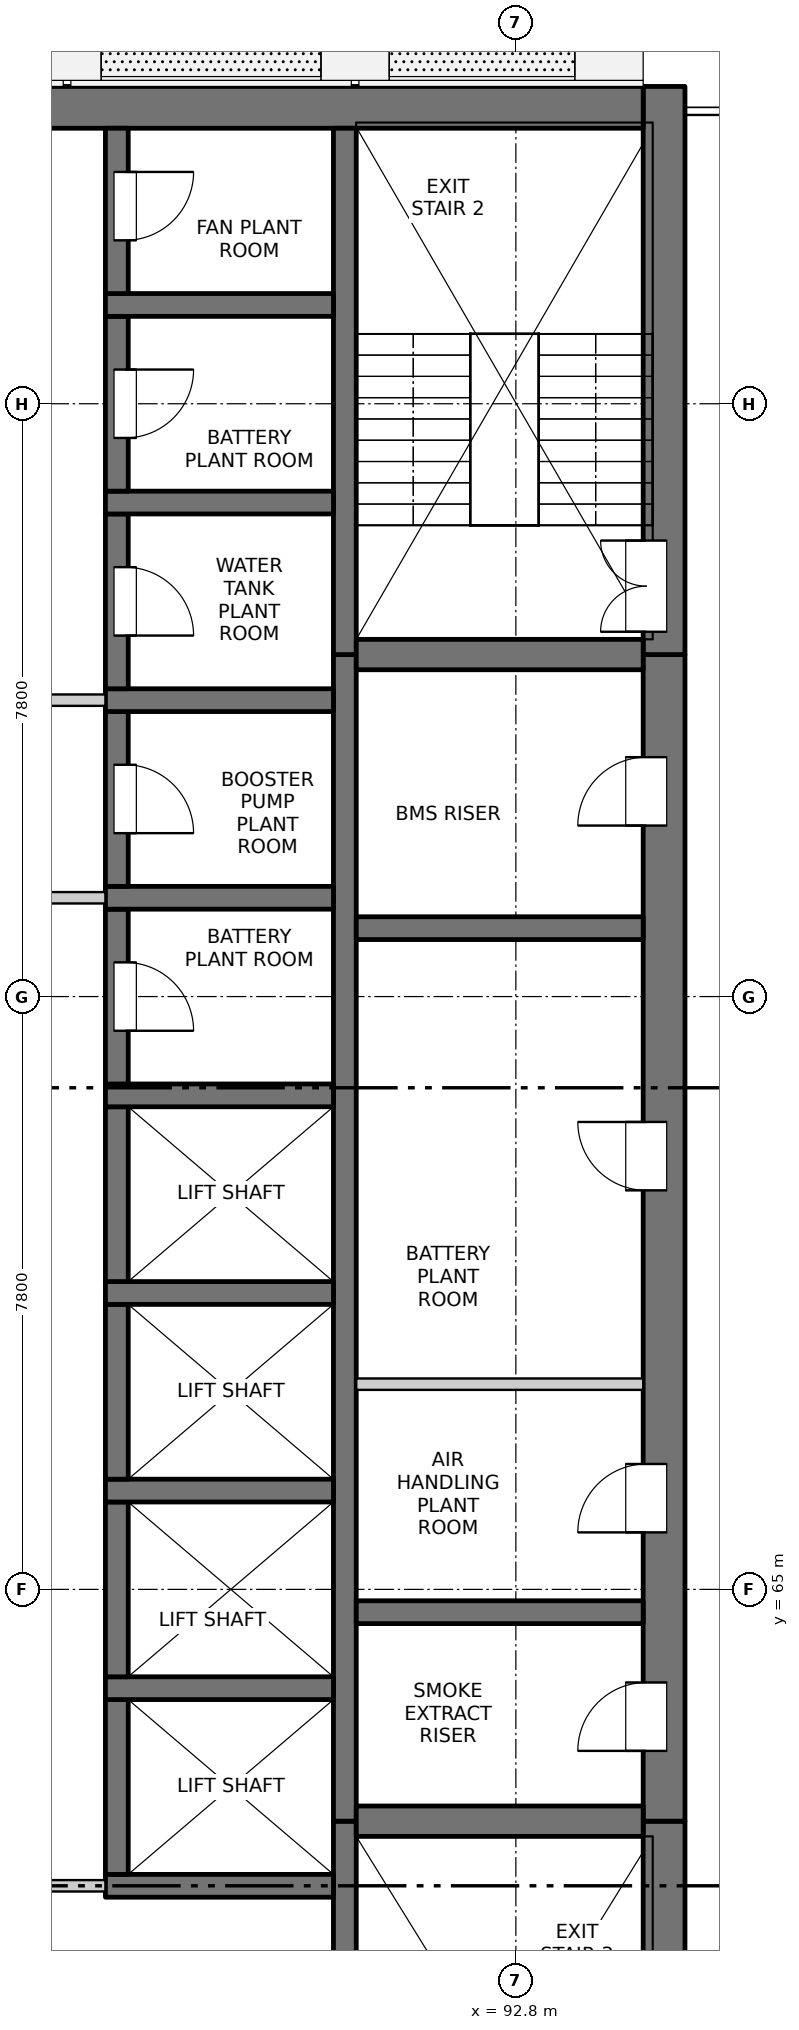
"""IFC4 building model, lengths in metres.
Left out: names, types, materials, properties, quantities, classifications, styles, units other than length and angle.
Written with IfcOpenShell. Run it as: python <this file> out.ifc"""

import sys

from ifc_helpers import new_model, si_unit, direction, frame, frame_2d, origin, place, context, subcontext, project, spatial, rectangle, extrude, element, fill, save


model = new_model("IFC4")
c1 = context("Model", 3, precision=1e-05, world=origin(), true_north=direction((0.0, 1.0)))
c2 = subcontext(c1, "Body", "Model", "MODEL_VIEW")
j1 = project(units=[si_unit("LENGTHUNIT", "METRE"), si_unit("PLANEANGLEUNIT", "RADIAN")], contexts=[c1])
p1 = place(None, origin())
s1 = spatial("IfcSite", under=j1, at=p1, CompositionType="ELEMENT")
p2 = place(p1, origin())
s2 = spatial("IfcBuilding", under=s1, at=p2, CompositionType="ELEMENT")
p3 = place(p2, frame((0.0, 0.0, 116.9)))
s3 = spatial("IfcBuildingStorey", under=s2, at=p3, CompositionType="ELEMENT", Elevation=116.9)
p4 = place(p3, frame((94.75, 54.975, -0.3), z_axis=(0.0, 0.0, 1.0), x_axis=(0.0, 1.0, 0.0)))
e1 = element("IfcWall", 1, at=p4, inside=s3, PredefinedType="SOLIDWALL", context=c2, shape_type="SweptSolid", body=[
    extrude(rectangle(XDim=6.975, YDim=0.55, at=frame_2d((3.487, 0.0))), origin(), (0.0, 0.0, 1.0), 6.8),
])
p5 = place(p4, frame((0.675, 0.0, 0.3)))
e2 = element("IfcOpeningElement", 2, at=p5, cuts=e1, PredefinedType="OPENING", context=c2, shape_type="SweptSolid", body=[
    extrude(rectangle(XDim=1.2, YDim=2.1, at=frame_2d((0.6, 1.05))), frame((0.0, 0.285, 0.0), z_axis=(0.0, -1.0, 0.0), x_axis=(1.0, 0.0, 0.0)), (0.0, 0.0, 1.0), 0.57),
])
p6 = place(p3, frame((94.75, 61.95, -0.3), z_axis=(0.0, 0.0, 1.0), x_axis=(0.0, 1.0, 0.0)))
e3 = element("IfcWall", 3, at=p6, inside=s3, PredefinedType="SOLIDWALL", context=c2, shape_type="SweptSolid", body=[
    extrude(rectangle(XDim=15.35, YDim=0.55, at=frame_2d((7.675, 0.0))), origin(), (0.0, 0.0, 1.0), 6.8),
])
p7 = place(p6, frame((0.925, 0.0, 0.3)))
e4 = element("IfcOpeningElement", 4, at=p7, cuts=e3, PredefinedType="OPENING", context=c2, shape_type="SweptSolid", body=[
    extrude(rectangle(XDim=0.9, YDim=2.1, at=frame_2d((0.45, 1.05))), frame((0.0, 0.285, 0.0), z_axis=(0.0, -1.0, 0.0), x_axis=(1.0, 0.0, 0.0)), (0.0, 0.0, 1.0), 0.57),
])
p8 = place(p6, frame((3.8, 0.0, 0.3)))
e5 = element("IfcOpeningElement", 5, at=p8, cuts=e3, PredefinedType="OPENING", context=c2, shape_type="SweptSolid", body=[
    extrude(rectangle(XDim=0.9, YDim=2.1, at=frame_2d((0.45, 1.05))), frame((0.0, 0.285, 0.0), z_axis=(0.0, -1.0, 0.0), x_axis=(1.0, 0.0, 0.0)), (0.0, 0.0, 1.0), 0.57),
])
p9 = place(p6, frame((8.3, 0.0, 0.3)))
e6 = element("IfcOpeningElement", 6, at=p9, cuts=e3, PredefinedType="OPENING", context=c2, shape_type="SweptSolid", body=[
    extrude(rectangle(XDim=0.9, YDim=2.1, at=frame_2d((0.45, 1.05))), frame((0.0, 0.285, 0.0), z_axis=(0.0, -1.0, 0.0), x_axis=(1.0, 0.0, 0.0)), (0.0, 0.0, 1.0), 0.57),
])
p10 = place(p6, frame((13.1, 0.0, 0.3)))
e7 = element("IfcOpeningElement", 7, at=p10, cuts=e3, PredefinedType="OPENING", context=c2, shape_type="SweptSolid", body=[
    extrude(rectangle(XDim=0.9, YDim=2.1, at=frame_2d((0.45, 1.05))), frame((0.0, 0.285, 0.0), z_axis=(0.0, -1.0, 0.0), x_axis=(1.0, 0.0, 0.0)), (0.0, 0.0, 1.0), 0.57),
])
p11 = place(p3, frame((94.75, 77.3, -0.3), z_axis=(0.0, 0.0, 1.0), x_axis=(0.0, 1.0, 0.0)))
e8 = element("IfcWall", 8, at=p11, inside=s3, PredefinedType="SOLIDWALL", context=c2, shape_type="SweptSolid", body=[
    extrude(rectangle(XDim=7.475, YDim=0.55, at=frame_2d((3.737, 0.0))), origin(), (0.0, 0.0, 1.0), 6.8),
])
p12 = place(p11, frame((0.3, 0.0, 0.3)))
e9 = element("IfcOpeningElement", 9, at=p12, cuts=e8, PredefinedType="OPENING", context=c2, shape_type="SweptSolid", body=[
    extrude(rectangle(XDim=1.2, YDim=2.1, at=frame_2d((0.6, 1.05))), frame((0.0, 0.285, 0.0), z_axis=(0.0, -1.0, 0.0), x_axis=(1.0, 0.0, 0.0)), (0.0, 0.0, 1.0), 0.57),
])
p13 = place(p3, frame((75.525, 84.5, -0.3), z_axis=(0.0, 0.0, 1.0), x_axis=(1.0, 0.0, 0.0)))
e10 = element("IfcWall", 10, at=p13, inside=s3, PredefinedType="SOLIDWALL", context=c2, shape_type="SweptSolid", body=[
    extrude(rectangle(XDim=18.95, YDim=0.55, at=frame_2d((9.475, 0.0))), origin(), (0.0, 0.0, 1.0), 6.8),
])
p14 = place(p3, frame((90.55, 55.525, -0.3), z_axis=(0.0, 0.0, 1.0), x_axis=(0.0, 1.0, 0.0)))
e11 = element("IfcWall", 11, at=p14, inside=s3, PredefinedType="SOLIDWALL", context=c2, shape_type="SweptSolid", body=[
    extrude(rectangle(XDim=6.425, YDim=0.3, at=frame_2d((3.212, 0.0))), origin(), (0.0, 0.0, 1.0), 6.8),
])
p15 = place(p14, frame((0.125, 0.0, 0.3)))
e12 = element("IfcOpeningElement", 12, at=p15, cuts=e11, PredefinedType="OPENING", context=c2, shape_type="SweptSolid", body=[
    extrude(rectangle(XDim=1.2, YDim=2.1, at=frame_2d((0.6, 1.05))), frame((0.0, 0.16, 0.0), z_axis=(0.0, -1.0, 0.0), x_axis=(1.0, 0.0, 0.0)), (0.0, 0.0, 1.0), 0.32),
])
p16 = place(p3, frame((90.55, 61.95, -0.3), z_axis=(0.0, 0.0, 1.0), x_axis=(0.0, 1.0, 0.0)))
e13 = element("IfcWall", 13, at=p16, inside=s3, PredefinedType="SOLIDWALL", context=c2, shape_type="SweptSolid", body=[
    extrude(rectangle(XDim=15.35, YDim=0.3, at=frame_2d((7.675, 0.0))), origin(), (0.0, 0.0, 1.0), 6.8),
])
p17 = place(p3, frame((90.55, 77.3, -0.3), z_axis=(0.0, 0.0, 1.0), x_axis=(0.0, 1.0, 0.0)))
e14 = element("IfcWall", 14, at=p17, inside=s3, PredefinedType="SOLIDWALL", context=c2, shape_type="SweptSolid", body=[
    extrude(rectangle(XDim=6.925, YDim=0.3, at=frame_2d((3.462, 0.0))), origin(), (0.0, 0.0, 1.0), 6.8),
])
p18 = place(p3, frame((87.4, 61.1, -0.3), z_axis=(0.0, 0.0, 1.0), x_axis=(1.0, 0.0, 0.0)))
e15 = element("IfcWall", 15, at=p18, inside=s3, PredefinedType="SOLIDWALL", context=c2, shape_type="SweptSolid", body=[
    extrude(rectangle(XDim=3.0, YDim=0.3, at=frame_2d((1.5, 0.0))), origin(), (0.0, 0.0, 1.0), 6.8),
])
p19 = place(p3, frame((87.55, 61.25, -0.3), z_axis=(0.0, 0.0, 1.0), x_axis=(0.0, 1.0, 0.0)))
e16 = element("IfcWall", 16, at=p19, inside=s3, PredefinedType="SOLIDWALL", context=c2, shape_type="SweptSolid", body=[
    extrude(rectangle(XDim=2.3, YDim=0.3, at=frame_2d((1.15, 0.0))), origin(), (0.0, 0.0, 1.0), 6.8),
])
p20 = place(p3, frame((87.4, 63.7, -0.3), z_axis=(0.0, 0.0, 1.0), x_axis=(1.0, 0.0, 0.0)))
e17 = element("IfcWall", 17, at=p20, inside=s3, PredefinedType="SOLIDWALL", context=c2, shape_type="SweptSolid", body=[
    extrude(rectangle(XDim=3.0, YDim=0.3, at=frame_2d((1.5, 0.0))), origin(), (0.0, 0.0, 1.0), 6.8),
])
p21 = place(p3, frame((87.55, 63.85, -0.3), z_axis=(0.0, 0.0, 1.0), x_axis=(0.0, 1.0, 0.0)))
e18 = element("IfcWall", 18, at=p21, inside=s3, PredefinedType="SOLIDWALL", context=c2, shape_type="SweptSolid", body=[
    extrude(rectangle(XDim=2.3, YDim=0.3, at=frame_2d((1.15, 0.0))), origin(), (0.0, 0.0, 1.0), 6.8),
])
p22 = place(p3, frame((87.4, 66.3, -0.3), z_axis=(0.0, 0.0, 1.0), x_axis=(1.0, 0.0, 0.0)))
e19 = element("IfcWall", 19, at=p22, inside=s3, PredefinedType="SOLIDWALL", context=c2, shape_type="SweptSolid", body=[
    extrude(rectangle(XDim=3.0, YDim=0.3, at=frame_2d((1.5, 0.0))), origin(), (0.0, 0.0, 1.0), 6.8),
])
p23 = place(p3, frame((87.55, 66.45, -0.3), z_axis=(0.0, 0.0, 1.0), x_axis=(0.0, 1.0, 0.0)))
e20 = element("IfcWall", 20, at=p23, inside=s3, PredefinedType="SOLIDWALL", context=c2, shape_type="SweptSolid", body=[
    extrude(rectangle(XDim=2.3, YDim=0.3, at=frame_2d((1.15, 0.0))), origin(), (0.0, 0.0, 1.0), 6.8),
])
p24 = place(p3, frame((87.4, 68.9, -0.3), z_axis=(0.0, 0.0, 1.0), x_axis=(1.0, 0.0, 0.0)))
e21 = element("IfcWall", 21, at=p24, inside=s3, PredefinedType="SOLIDWALL", context=c2, shape_type="SweptSolid", body=[
    extrude(rectangle(XDim=3.0, YDim=0.3, at=frame_2d((1.5, 0.0))), origin(), (0.0, 0.0, 1.0), 6.8),
])
p25 = place(p3, frame((87.55, 69.05, -0.3), z_axis=(0.0, 0.0, 1.0), x_axis=(0.0, 1.0, 0.0)))
e22 = element("IfcWall", 22, at=p25, inside=s3, PredefinedType="SOLIDWALL", context=c2, shape_type="SweptSolid", body=[
    extrude(rectangle(XDim=2.3, YDim=0.3, at=frame_2d((1.15, 0.0))), origin(), (0.0, 0.0, 1.0), 6.8),
])
p26 = place(p3, frame((87.4, 71.5, -0.3), z_axis=(0.0, 0.0, 1.0), x_axis=(1.0, 0.0, 0.0)))
e23 = element("IfcWall", 23, at=p26, inside=s3, PredefinedType="SOLIDWALL", context=c2, shape_type="SweptSolid", body=[
    extrude(rectangle(XDim=3.0, YDim=0.3, at=frame_2d((1.5, 0.0))), origin(), (0.0, 0.0, 1.0), 6.8),
])
p27 = place(p3, frame((87.55, 71.65, -0.3), z_axis=(0.0, 0.0, 1.0), x_axis=(0.0, 1.0, 0.0)))
e24 = element("IfcWall", 24, at=p27, inside=s3, PredefinedType="SOLIDWALL", context=c2, shape_type="SweptSolid", body=[
    extrude(rectangle(XDim=2.3, YDim=0.3, at=frame_2d((1.15, 0.0))), origin(), (0.0, 0.0, 1.0), 6.8),
])
p28 = place(p27, frame((0.7, 0.0, 0.3)))
e25 = element("IfcOpeningElement", 25, at=p28, cuts=e24, PredefinedType="OPENING", context=c2, shape_type="SweptSolid", body=[
    extrude(rectangle(XDim=0.9, YDim=2.1, at=frame_2d((0.45, 1.05))), frame((0.0, 0.16, 0.0), z_axis=(0.0, -1.0, 0.0), x_axis=(1.0, 0.0, 0.0)), (0.0, 0.0, 1.0), 0.32),
])
p29 = place(p3, frame((87.4, 74.1, -0.3), z_axis=(0.0, 0.0, 1.0), x_axis=(1.0, 0.0, 0.0)))
e26 = element("IfcWall", 26, at=p29, inside=s3, PredefinedType="SOLIDWALL", context=c2, shape_type="SweptSolid", body=[
    extrude(rectangle(XDim=3.0, YDim=0.3, at=frame_2d((1.5, 0.0))), origin(), (0.0, 0.0, 1.0), 6.8),
])
p30 = place(p3, frame((87.55, 74.25, -0.3), z_axis=(0.0, 0.0, 1.0), x_axis=(0.0, 1.0, 0.0)))
e27 = element("IfcWall", 27, at=p30, inside=s3, PredefinedType="SOLIDWALL", context=c2, shape_type="SweptSolid", body=[
    extrude(rectangle(XDim=2.3, YDim=0.3, at=frame_2d((1.15, 0.0))), origin(), (0.0, 0.0, 1.0), 6.8),
])
p31 = place(p30, frame((0.7, 0.0, 0.3)))
e28 = element("IfcOpeningElement", 28, at=p31, cuts=e27, PredefinedType="OPENING", context=c2, shape_type="SweptSolid", body=[
    extrude(rectangle(XDim=0.9, YDim=2.1, at=frame_2d((0.45, 1.05))), frame((0.0, 0.16, 0.0), z_axis=(0.0, -1.0, 0.0), x_axis=(1.0, 0.0, 0.0)), (0.0, 0.0, 1.0), 0.32),
])
p32 = place(p3, frame((87.4, 76.7, -0.3), z_axis=(0.0, 0.0, 1.0), x_axis=(1.0, 0.0, 0.0)))
e29 = element("IfcWall", 29, at=p32, inside=s3, PredefinedType="SOLIDWALL", context=c2, shape_type="SweptSolid", body=[
    extrude(rectangle(XDim=3.0, YDim=0.3, at=frame_2d((1.5, 0.0))), origin(), (0.0, 0.0, 1.0), 6.8),
])
p33 = place(p3, frame((87.55, 76.85, -0.3), z_axis=(0.0, 0.0, 1.0), x_axis=(0.0, 1.0, 0.0)))
e30 = element("IfcWall", 30, at=p33, inside=s3, PredefinedType="SOLIDWALL", context=c2, shape_type="SweptSolid", body=[
    extrude(rectangle(XDim=2.3, YDim=0.3, at=frame_2d((1.15, 0.0))), origin(), (0.0, 0.0, 1.0), 6.8),
])
p34 = place(p33, frame((0.7, 0.0, 0.3)))
e31 = element("IfcOpeningElement", 31, at=p34, cuts=e30, PredefinedType="OPENING", context=c2, shape_type="SweptSolid", body=[
    extrude(rectangle(XDim=0.9, YDim=2.1, at=frame_2d((0.45, 1.05))), frame((0.0, 0.16, 0.0), z_axis=(0.0, -1.0, 0.0), x_axis=(1.0, 0.0, 0.0)), (0.0, 0.0, 1.0), 0.32),
])
p35 = place(p3, frame((87.4, 79.3, -0.3), z_axis=(0.0, 0.0, 1.0), x_axis=(1.0, 0.0, 0.0)))
e32 = element("IfcWall", 32, at=p35, inside=s3, PredefinedType="SOLIDWALL", context=c2, shape_type="SweptSolid", body=[
    extrude(rectangle(XDim=3.0, YDim=0.3, at=frame_2d((1.5, 0.0))), origin(), (0.0, 0.0, 1.0), 6.8),
])
p36 = place(p3, frame((87.55, 79.45, -0.3), z_axis=(0.0, 0.0, 1.0), x_axis=(0.0, 1.0, 0.0)))
e33 = element("IfcWall", 33, at=p36, inside=s3, PredefinedType="SOLIDWALL", context=c2, shape_type="SweptSolid", body=[
    extrude(rectangle(XDim=2.3, YDim=0.3, at=frame_2d((1.15, 0.0))), origin(), (0.0, 0.0, 1.0), 6.8),
])
p37 = place(p36, frame((0.7, 0.0, 0.3)))
e34 = element("IfcOpeningElement", 34, at=p37, cuts=e33, PredefinedType="OPENING", context=c2, shape_type="SweptSolid", body=[
    extrude(rectangle(XDim=0.9, YDim=2.1, at=frame_2d((0.45, 1.05))), frame((0.0, 0.16, 0.0), z_axis=(0.0, -1.0, 0.0), x_axis=(1.0, 0.0, 0.0)), (0.0, 0.0, 1.0), 0.32),
])
p38 = place(p3, frame((87.4, 81.9, -0.3), z_axis=(0.0, 0.0, 1.0), x_axis=(1.0, 0.0, 0.0)))
e35 = element("IfcWall", 35, at=p38, inside=s3, PredefinedType="SOLIDWALL", context=c2, shape_type="SweptSolid", body=[
    extrude(rectangle(XDim=3.0, YDim=0.3, at=frame_2d((1.5, 0.0))), origin(), (0.0, 0.0, 1.0), 6.8),
])
p39 = place(p3, frame((87.55, 82.05, -0.3), z_axis=(0.0, 0.0, 1.0), x_axis=(0.0, 1.0, 0.0)))
e36 = element("IfcWall", 36, at=p39, inside=s3, PredefinedType="SOLIDWALL", context=c2, shape_type="SweptSolid", body=[
    extrude(rectangle(XDim=2.175, YDim=0.3, at=frame_2d((1.087, 0.0))), origin(), (0.0, 0.0, 1.0), 6.8),
])
p40 = place(p39, frame((0.7, 0.0, 0.3)))
e37 = element("IfcOpeningElement", 37, at=p40, cuts=e36, PredefinedType="OPENING", context=c2, shape_type="SweptSolid", body=[
    extrude(rectangle(XDim=0.9, YDim=2.1, at=frame_2d((0.45, 1.05))), frame((0.0, 0.16, 0.0), z_axis=(0.0, -1.0, 0.0), x_axis=(1.0, 0.0, 0.0)), (0.0, 0.0, 1.0), 0.32),
])
p41 = place(p3, frame((90.7, 61.95, -0.3), z_axis=(0.0, 0.0, 1.0), x_axis=(1.0, 0.0, 0.0)))
e38 = element("IfcWall", 38, at=p41, inside=s3, PredefinedType="SOLIDWALL", context=c2, shape_type="SweptSolid", body=[
    extrude(rectangle(XDim=3.775, YDim=0.4, at=frame_2d((1.888, 0.0))), origin(), (0.0, 0.0, 1.0), 6.8),
])
for number, where, z_axis, x_axis in (
    (39, (90.7, 64.7, -0.3), (0.0, 0.0, 1.0), (1.0, 0.0, 0.0)),
    (40, (90.7, 73.7, -0.3), (0.0, 0.0, 1.0), (1.0, 0.0, 0.0)),
):
    element("IfcWall", number, at=place(p3, frame(where, z_axis=z_axis, x_axis=x_axis)), inside=s3, PredefinedType="SOLIDWALL", context=c2, shape_type="SweptSolid", body=[
        extrude(rectangle(XDim=3.775, YDim=0.3, at=frame_2d((1.888, 0.0))), origin(), (0.0, 0.0, 1.0), 6.8),
    ])
p42 = place(p3, frame((90.7, 77.3, -0.3), z_axis=(0.0, 0.0, 1.0), x_axis=(1.0, 0.0, 0.0)))
e41 = element("IfcWall", 41, at=p42, inside=s3, PredefinedType="SOLIDWALL", context=c2, shape_type="SweptSolid", body=[
    extrude(rectangle(XDim=3.775, YDim=0.4, at=frame_2d((1.888, 0.0))), origin(), (0.0, 0.0, 1.0), 6.8),
])
p43 = place(p3, frame((82.6, 61.1, 0.0), z_axis=(0.0, 0.0, 1.0), x_axis=(1.0, 0.0, 0.0)))
e42 = element("IfcWall", 42, at=p43, inside=s3, PredefinedType="PARTITIONING", context=c2, shape_type="SweptSolid", body=[
    extrude(rectangle(XDim=4.8, YDim=0.15, at=frame_2d((2.4, 0.0))), origin(), (0.0, 0.0, 1.0), 6.5),
])
p44 = place(p43, frame((1.5, 0.0, 0.0)))
e43 = element("IfcOpeningElement", 43, at=p44, cuts=e42, PredefinedType="OPENING", context=c2, shape_type="SweptSolid", body=[
    extrude(rectangle(XDim=1.8, YDim=2.1, at=frame_2d((0.9, 1.05))), frame((0.0, 0.085, 0.0), z_axis=(0.0, -1.0, 0.0), x_axis=(1.0, 0.0, 0.0)), (0.0, 0.0, 1.0), 0.17),
])
p45 = place(p3, frame((90.7, 67.7, 0.0), z_axis=(0.0, 0.0, 1.0), x_axis=(1.0, 0.0, 0.0)))
e44 = element("IfcWall", 44, at=p45, inside=s3, PredefinedType="PARTITIONING", context=c2, shape_type="SweptSolid", body=[
    extrude(rectangle(XDim=3.775, YDim=0.15, at=frame_2d((1.887, 0.0))), origin(), (0.0, 0.0, 1.0), 6.5),
])
p46 = place(p3, frame((82.6, 74.1, 0.0), z_axis=(0.0, 0.0, 1.0), x_axis=(1.0, 0.0, 0.0)))
e45 = element("IfcWall", 45, at=p46, inside=s3, PredefinedType="PARTITIONING", context=c2, shape_type="SweptSolid", body=[
    extrude(rectangle(XDim=4.8, YDim=0.15, at=frame_2d((2.4, 0.0))), origin(), (0.0, 0.0, 1.0), 6.5),
])
p47 = place(p46, frame((1.5, 0.0, 0.0)))
e46 = element("IfcOpeningElement", 46, at=p47, cuts=e45, PredefinedType="OPENING", context=c2, shape_type="SweptSolid", body=[
    extrude(rectangle(XDim=1.8, YDim=2.1, at=frame_2d((0.9, 1.05))), frame((0.0, 0.085, 0.0), z_axis=(0.0, -1.0, 0.0), x_axis=(1.0, 0.0, 0.0)), (0.0, 0.0, 1.0), 0.17),
])
p48 = place(p3, frame((82.6, 76.7, 0.0), z_axis=(0.0, 0.0, 1.0), x_axis=(1.0, 0.0, 0.0)))
e47 = element("IfcWall", 47, at=p48, inside=s3, PredefinedType="PARTITIONING", context=c2, shape_type="SweptSolid", body=[
    extrude(rectangle(XDim=4.8, YDim=0.15, at=frame_2d((2.4, 0.0))), origin(), (0.0, 0.0, 1.0), 6.5),
])
p49 = place(p48, frame((1.5, 0.0, 0.0)))
e48 = element("IfcOpeningElement", 48, at=p49, cuts=e47, PredefinedType="OPENING", context=c2, shape_type="SweptSolid", body=[
    extrude(rectangle(XDim=1.8, YDim=2.1, at=frame_2d((0.9, 1.05))), frame((0.0, 0.085, 0.0), z_axis=(0.0, -1.0, 0.0), x_axis=(1.0, 0.0, 0.0)), (0.0, 0.0, 1.0), 0.17),
])
p50 = place(p7, origin())
e49 = element("IfcDoor", 49, at=p50, inside=s3, OperationType="SINGLE_SWING_LEFT", PredefinedType="DOOR", context=c2, shape_type="SweptSolid", body=[
    extrude(rectangle(XDim=0.9, YDim=2.1, at=frame_2d((0.45, 1.05))), frame((0.0, 0.26, 0.0), z_axis=(0.0, -1.0, 0.0), x_axis=(1.0, 0.0, 0.0)), (0.0, 0.0, 1.0), 0.05),
])
fill(e4, e49)
p51 = place(p8, origin())
e50 = element("IfcDoor", 50, at=p51, inside=s3, OperationType="SINGLE_SWING_LEFT", PredefinedType="DOOR", context=c2, shape_type="SweptSolid", body=[
    extrude(rectangle(XDim=0.9, YDim=2.1, at=frame_2d((0.45, 1.05))), frame((0.0, 0.26, 0.0), z_axis=(0.0, -1.0, 0.0), x_axis=(1.0, 0.0, 0.0)), (0.0, 0.0, 1.0), 0.05),
])
fill(e5, e50)
p52 = place(p9, origin())
e51 = element("IfcDoor", 51, at=p52, inside=s3, OperationType="SINGLE_SWING_RIGHT", PredefinedType="DOOR", context=c2, shape_type="SweptSolid", body=[
    extrude(rectangle(XDim=0.9, YDim=2.1, at=frame_2d((0.45, 1.05))), frame((0.0, 0.26, 0.0), z_axis=(0.0, -1.0, 0.0), x_axis=(1.0, 0.0, 0.0)), (0.0, 0.0, 1.0), 0.05),
])
fill(e6, e51)
p53 = place(p28, origin())
e52 = element("IfcDoor", 52, at=p53, inside=s3, OperationType="SINGLE_SWING_RIGHT", PredefinedType="DOOR", context=c2, shape_type="SweptSolid", body=[
    extrude(rectangle(XDim=0.9, YDim=2.1, at=frame_2d((0.45, 1.05))), frame((0.0, -0.085, 0.0), z_axis=(0.0, -1.0, 0.0), x_axis=(1.0, 0.0, 0.0)), (0.0, 0.0, 1.0), 0.05),
])
fill(e25, e52)
p54 = place(p31, origin())
e53 = element("IfcDoor", 53, at=p54, inside=s3, OperationType="SINGLE_SWING_RIGHT", PredefinedType="DOOR", context=c2, shape_type="SweptSolid", body=[
    extrude(rectangle(XDim=0.9, YDim=2.1, at=frame_2d((0.45, 1.05))), frame((0.0, -0.085, 0.0), z_axis=(0.0, -1.0, 0.0), x_axis=(1.0, 0.0, 0.0)), (0.0, 0.0, 1.0), 0.05),
])
fill(e28, e53)
p55 = place(p10, origin())
e54 = element("IfcDoor", 54, at=p55, inside=s3, OperationType="SINGLE_SWING_LEFT", PredefinedType="DOOR", context=c2, shape_type="SweptSolid", body=[
    extrude(rectangle(XDim=0.9, YDim=2.1, at=frame_2d((0.45, 1.05))), frame((0.0, 0.26, 0.0), z_axis=(0.0, -1.0, 0.0), x_axis=(1.0, 0.0, 0.0)), (0.0, 0.0, 1.0), 0.05),
])
fill(e7, e54)
p56 = place(p34, origin())
e55 = element("IfcDoor", 55, at=p56, inside=s3, OperationType="SINGLE_SWING_RIGHT", PredefinedType="DOOR", context=c2, shape_type="SweptSolid", body=[
    extrude(rectangle(XDim=0.9, YDim=2.1, at=frame_2d((0.45, 1.05))), frame((0.0, -0.085, 0.0), z_axis=(0.0, -1.0, 0.0), x_axis=(1.0, 0.0, 0.0)), (0.0, 0.0, 1.0), 0.05),
])
fill(e31, e55)
p57 = place(p12, origin())
e56 = element("IfcDoor", 56, at=p57, inside=s3, OperationType="DOUBLE_DOOR_SINGLE_SWING", PredefinedType="DOOR", context=c2, shape_type="SweptSolid", body=[
    extrude(rectangle(XDim=1.2, YDim=2.1, at=frame_2d((0.6, 1.05))), frame((0.0, 0.26, 0.0), z_axis=(0.0, -1.0, 0.0), x_axis=(1.0, 0.0, 0.0)), (0.0, 0.0, 1.0), 0.05),
])
fill(e9, e56)
p58 = place(p37, origin())
e57 = element("IfcDoor", 57, at=p58, inside=s3, OperationType="SINGLE_SWING_LEFT", PredefinedType="DOOR", context=c2, shape_type="SweptSolid", body=[
    extrude(rectangle(XDim=0.9, YDim=2.1, at=frame_2d((0.45, 1.05))), frame((0.0, -0.085, 0.0), z_axis=(0.0, -1.0, 0.0), x_axis=(1.0, 0.0, 0.0)), (0.0, 0.0, 1.0), 0.05),
])
fill(e34, e57)
p59 = place(p40, origin())
e58 = element("IfcDoor", 58, at=p59, inside=s3, OperationType="SINGLE_SWING_LEFT", PredefinedType="DOOR", context=c2, shape_type="SweptSolid", body=[
    extrude(rectangle(XDim=0.9, YDim=2.1, at=frame_2d((0.45, 1.05))), frame((0.0, -0.085, 0.0), z_axis=(0.0, -1.0, 0.0), x_axis=(1.0, 0.0, 0.0)), (0.0, 0.0, 1.0), 0.05),
])
fill(e37, e58)
save(model, sys.argv[1])
